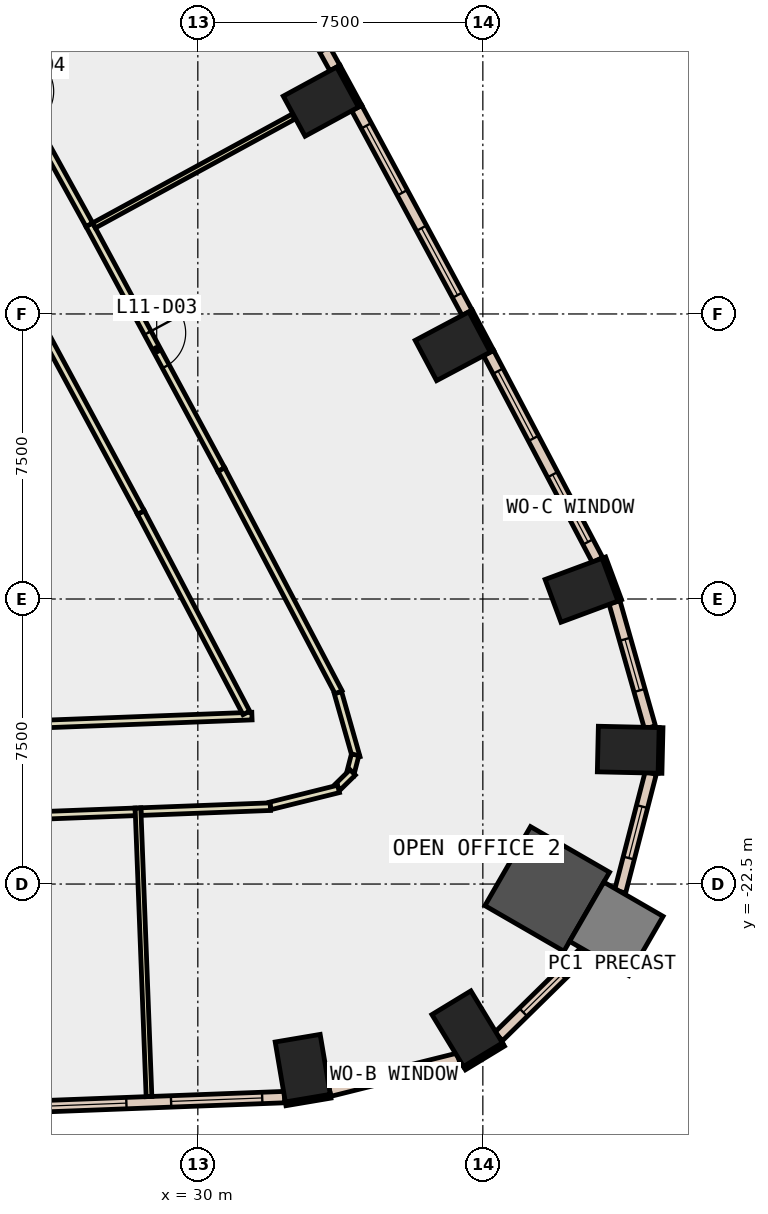
"""IFC4 building model, lengths in metres.
Left out: names, types, materials, properties, quantities, classifications, styles, units other than length and angle.
Written with IfcOpenShell. Run it as: python <this file> out.ifc"""

import sys

from ifc_helpers import new_model, si_unit, direction, frame, frame_2d, origin, origin_2d, place, context, subcontext, project, spatial, rectangle, extrude, element, fill, save


model = new_model("IFC4")
c1 = context("Model", 3, precision=1e-05, world=origin(), true_north=direction((0.0, 1.0)))
c2 = subcontext(c1, "Body", "Model", "MODEL_VIEW")
j1 = project(units=[si_unit("LENGTHUNIT", "METRE"), si_unit("PLANEANGLEUNIT", "RADIAN")], contexts=[c1])
p1 = place(None, origin())
s1 = spatial("IfcSite", under=j1, at=p1, CompositionType="ELEMENT")
p2 = place(p1, origin())
s2 = spatial("IfcBuilding", under=s1, at=p2, CompositionType="ELEMENT")
p3 = place(p2, frame((0.0, 0.0, 56.0)))
s3 = spatial("IfcBuildingStorey", under=s2, at=p3, CompositionType="ELEMENT", Elevation=56.0)
for number, where, z_axis, x_axis in (
    (1, (32.761, -27.345, -0.4), (0.0, 0.0, 1.0), (0.986, 0.167, 0.0)),
    (2, (37.088, -26.307, -0.4), (0.0, 0.0, 1.0), (0.855, 0.519, 0.0)),
):
    element("IfcColumn", number, at=place(p3, frame(where, z_axis=z_axis, x_axis=x_axis)), inside=s3, PredefinedType="COLUMN", context=c2, shape_type="SweptSolid", body=[
        extrude(rectangle(XDim=1.2, YDim=1.6, at=origin_2d()), origin(), (0.0, 0.0, 1.0), 4.2),
    ])
p4 = place(p3, frame((39.194, -22.629, -0.4), z_axis=(0.0, 0.0, 1.0), x_axis=(-0.866025403784, 0.5, 0.0)))
e3 = element("IfcColumn", 3, at=p4, inside=s3, PredefinedType="COLUMN", context=c2, shape_type="SweptSolid", body=[
    extrude(rectangle(XDim=2.4, YDim=2.4, at=origin_2d()), origin(), (0.0, 0.0, 1.0), 4.2),
])
for number, where, z_axis, x_axis in (
    (4, (41.326, -18.966, -0.4), (0.0, 0.0, 1.0), (0.023, 1.0, 0.0)),
    (5, (40.097, -14.77, -0.4), (0.0, 0.0, 1.0), (-0.348, 0.937, 0.0)),
    (6, (36.708, -8.349, -0.4), (0.0, 0.0, 1.0), (-0.469, 0.883, 0.0)),
    (7, (33.238, -1.913, -0.4), (0.0, 0.0, 1.0), (-0.478, 0.878, 0.0)),
):
    element("IfcColumn", number, at=place(p3, frame(where, z_axis=z_axis, x_axis=x_axis)), inside=s3, PredefinedType="COLUMN", context=c2, shape_type="SweptSolid", body=[
        extrude(rectangle(XDim=1.2, YDim=1.6, at=origin_2d()), origin(), (0.0, 0.0, 1.0), 4.2),
    ])
p5 = place(p3, frame((41.013, -23.679, -0.4), z_axis=(0.0, 0.0, 1.0), x_axis=(-0.866025403784, 0.5, 0.0)))
e8 = element("IfcColumn", 8, at=p5, inside=s3, PredefinedType="COLUMN", context=c2, shape_type="SweptSolid", body=[
    extrude(rectangle(XDim=1.8, YDim=1.8, at=origin_2d()), origin(), (0.0, 0.0, 1.0), 4.2),
])
p6 = place(p3, frame((41.103, -15.037, 0.0), z_axis=(0.0, 0.0, 1.0), x_axis=(-0.348268249601, 0.937394914814, 0.0)))
e9 = element("IfcWall", 9, at=p6, inside=s3, PredefinedType="STANDARD", context=c2, shape_type="SweptSolid", body=[
    extrude(rectangle(XDim=1.2, YDim=0.1, at=frame_2d((0.6, 0.0))), origin(), (0.0, 0.0, 1.0), 3.8),
])
p7 = place(p3, frame((37.74, -8.48, 0.0), z_axis=(0.0, 0.0, 1.0), x_axis=(-0.469383408131, 0.882994459876, 0.0)))
e10 = element("IfcWall", 10, at=p7, inside=s3, PredefinedType="STANDARD", context=c2, shape_type="SweptSolid", body=[
    extrude(rectangle(XDim=1.199, YDim=0.1, at=frame_2d((0.6, 0.0))), origin(), (0.0, 0.0, 1.0), 3.8),
])
p8 = place(p3, frame((34.271, -2.034, 0.0), z_axis=(0.0, 0.0, 1.0), x_axis=(-0.478267644701, 0.878214131082, 0.0)))
e11 = element("IfcWall", 11, at=p8, inside=s3, PredefinedType="STANDARD", context=c2, shape_type="SweptSolid", body=[
    extrude(rectangle(XDim=1.2, YDim=0.1, at=frame_2d((0.6, 0.0))), origin(), (0.0, 0.0, 1.0), 3.8),
])
p9 = place(p3, frame((32.311, -28.283, 0.0), z_axis=(0.0, 0.0, 1.0), x_axis=(0.986011774526, 0.166675674579, 0.0)))
e12 = element("IfcWall", 12, at=p9, inside=s3, PredefinedType="STANDARD", context=c2, shape_type="SweptSolid", body=[
    extrude(rectangle(XDim=1.2, YDim=0.1, at=frame_2d((0.6, 0.0))), origin(), (0.0, 0.0, 1.0), 3.8),
])
for number, where, z_axis, x_axis in (
    (13, (37.016, -27.345, 0.0), (0.0, 0.0, 1.0), (0.855, 0.519, 0.0)),
    (14, (42.162, -19.585, 0.0), (0.0, 0.0, 1.0), (0.023, 1.0, 0.0)),
):
    element("IfcWall", number, at=place(p3, frame(where, z_axis=z_axis, x_axis=x_axis)), inside=s3, PredefinedType="STANDARD", context=c2, shape_type="SweptSolid", body=[
        extrude(rectangle(XDim=1.2, YDim=0.1, at=frame_2d((0.6, 0.0))), origin(), (0.0, 0.0, 1.0), 3.8),
    ])
p10 = place(p3, frame((25.134, -28.378, 0.0), z_axis=(0.0, 0.0, 1.0), x_axis=(0.999276920032, 0.038021534562, 0.0)))
e15 = element("IfcWall", 15, at=p10, inside=s3, PredefinedType="STANDARD", context=c2, shape_type="SweptSolid", body=[
    extrude(rectangle(XDim=7.153, YDim=0.3, at=frame_2d((3.577, 0.0))), origin(), (0.0, 0.0, 1.0), 3.8),
])
p11 = place(p10, frame((0.588, 0.0, 0.9)))
e16 = element("IfcOpeningElement", 16, at=p11, cuts=e15, PredefinedType="OPENING", context=c2, shape_type="SweptSolid", body=[
    extrude(rectangle(XDim=2.4, YDim=2.6, at=frame_2d((1.2, 1.3))), frame((0.0, 0.16, 0.0), z_axis=(0.0, -1.0, 0.0), x_axis=(1.0, 0.0, 0.0)), (0.0, 0.0, 1.0), 0.32),
])
p12 = place(p10, frame((4.165, 0.0, 0.9)))
e17 = element("IfcOpeningElement", 17, at=p12, cuts=e15, PredefinedType="OPENING", context=c2, shape_type="SweptSolid", body=[
    extrude(rectangle(XDim=2.4, YDim=2.6, at=frame_2d((1.2, 1.3))), frame((0.0, 0.16, 0.0), z_axis=(0.0, -1.0, 0.0), x_axis=(1.0, 0.0, 0.0)), (0.0, 0.0, 1.0), 0.32),
])
p13 = place(p3, frame((33.469, -27.939, 0.0), z_axis=(0.0, 0.0, 1.0), x_axis=(0.970331016871, 0.241780308749, 0.0)))
e18 = element("IfcWall", 18, at=p13, inside=s3, PredefinedType="STANDARD", context=c2, shape_type="SweptSolid", body=[
    extrude(rectangle(XDim=3.499, YDim=0.3, at=frame_2d((1.75, 0.0))), origin(), (0.0, 0.0, 1.0), 3.8),
])
p14 = place(p13, frame((1.049, 0.0, 0.9)))
e19 = element("IfcOpeningElement", 19, at=p14, cuts=e18, PredefinedType="OPENING", context=c2, shape_type="SweptSolid", body=[
    extrude(rectangle(XDim=1.4, YDim=2.6, at=frame_2d((0.7, 1.3))), frame((0.0, 0.16, 0.0), z_axis=(0.0, -1.0, 0.0), x_axis=(1.0, 0.0, 0.0)), (0.0, 0.0, 1.0), 0.32),
])
p15 = place(p3, frame((37.914, -26.513, 0.0), z_axis=(0.0, 0.0, 1.0), x_axis=(0.71340487189, 0.700752087948, 0.0)))
e20 = element("IfcWall", 20, at=p15, inside=s3, PredefinedType="STANDARD", context=c2, shape_type="SweptSolid", body=[
    extrude(rectangle(XDim=3.222, YDim=0.3, at=frame_2d((1.611, 0.0))), origin(), (0.0, 0.0, 1.0), 3.8),
])
p16 = place(p15, frame((0.911, 0.0, 0.9)))
e21 = element("IfcOpeningElement", 21, at=p16, cuts=e20, PredefinedType="OPENING", context=c2, shape_type="SweptSolid", body=[
    extrude(rectangle(XDim=1.4, YDim=2.6, at=frame_2d((0.7, 1.3))), frame((0.0, 0.16, 0.0), z_axis=(0.0, -1.0, 0.0), x_axis=(1.0, 0.0, 0.0)), (0.0, 0.0, 1.0), 0.32),
])
p17 = place(p3, frame((41.112, -22.698, 0.0), z_axis=(0.0, 0.0, 1.0), x_axis=(0.250086521833, 0.968223492587, 0.0)))
e22 = element("IfcWall", 22, at=p17, inside=s3, PredefinedType="STANDARD", context=c2, shape_type="SweptSolid", body=[
    extrude(rectangle(XDim=3.222, YDim=0.3, at=frame_2d((1.611, 0.0))), origin(), (0.0, 0.0, 1.0), 3.8),
])
p18 = place(p17, frame((0.911, 0.0, 0.9)))
e23 = element("IfcOpeningElement", 23, at=p18, cuts=e22, PredefinedType="OPENING", context=c2, shape_type="SweptSolid", body=[
    extrude(rectangle(XDim=1.4, YDim=2.6, at=frame_2d((0.7, 1.3))), frame((0.0, 0.16, 0.0), z_axis=(0.0, -1.0, 0.0), x_axis=(1.0, 0.0, 0.0)), (0.0, 0.0, 1.0), 0.32),
])
p19 = place(p3, frame((41.898, -18.379, 0.0), z_axis=(0.0, 0.0, 1.0), x_axis=(-0.272901963142, 0.962041848629, 0.0)))
e24 = element("IfcWall", 24, at=p19, inside=s3, PredefinedType="STANDARD", context=c2, shape_type="SweptSolid", body=[
    extrude(rectangle(XDim=3.422, YDim=0.3, at=frame_2d((1.711, 0.0))), origin(), (0.0, 0.0, 1.0), 3.8),
])
p20 = place(p19, frame((1.011, 0.0, 0.9)))
e25 = element("IfcOpeningElement", 25, at=p20, cuts=e24, PredefinedType="OPENING", context=c2, shape_type="SweptSolid", body=[
    extrude(rectangle(XDim=1.4, YDim=2.6, at=frame_2d((0.7, 1.3))), frame((0.0, 0.16, 0.0), z_axis=(0.0, -1.0, 0.0), x_axis=(1.0, 0.0, 0.0)), (0.0, 0.0, 1.0), 0.32),
])
p21 = place(p3, frame((40.518, -13.975, 0.0), z_axis=(0.0, 0.0, 1.0), x_axis=(-0.465847756605, 0.884864886673, 0.0)))
e26 = element("IfcWall", 26, at=p21, inside=s3, PredefinedType="STANDARD", context=c2, shape_type="SweptSolid", body=[
    extrude(rectangle(XDim=6.157, YDim=0.3, at=frame_2d((3.079, 0.0))), origin(), (0.0, 0.0, 1.0), 3.8),
])
p22 = place(p21, frame((0.539, 0.0, 0.9)))
e27 = element("IfcOpeningElement", 27, at=p22, cuts=e26, PredefinedType="OPENING", context=c2, shape_type="SweptSolid", body=[
    extrude(rectangle(XDim=2.0, YDim=2.6, at=frame_2d((1.0, 1.3))), frame((0.0, 0.16, 0.0), z_axis=(0.0, -1.0, 0.0), x_axis=(1.0, 0.0, 0.0)), (0.0, 0.0, 1.0), 0.32),
])
p23 = place(p21, frame((3.618, 0.0, 0.9)))
e28 = element("IfcOpeningElement", 28, at=p23, cuts=e26, PredefinedType="OPENING", context=c2, shape_type="SweptSolid", body=[
    extrude(rectangle(XDim=2.0, YDim=2.6, at=frame_2d((1.0, 1.3))), frame((0.0, 0.16, 0.0), z_axis=(0.0, -1.0, 0.0), x_axis=(1.0, 0.0, 0.0)), (0.0, 0.0, 1.0), 0.32),
])
p24 = place(p3, frame((37.086, -7.47, 0.0), z_axis=(0.0, 0.0, 1.0), x_axis=(-0.474584950749, 0.880209704856, 0.0)))
e29 = element("IfcWall", 29, at=p24, inside=s3, PredefinedType="STANDARD", context=c2, shape_type="SweptSolid", body=[
    extrude(rectangle(XDim=6.121, YDim=0.3, at=frame_2d((3.061, 0.0))), origin(), (0.0, 0.0, 1.0), 3.8),
])
p25 = place(p24, frame((0.53, 0.0, 0.9)))
e30 = element("IfcOpeningElement", 30, at=p25, cuts=e29, PredefinedType="OPENING", context=c2, shape_type="SweptSolid", body=[
    extrude(rectangle(XDim=2.0, YDim=2.6, at=frame_2d((1.0, 1.3))), frame((0.0, 0.16, 0.0), z_axis=(0.0, -1.0, 0.0), x_axis=(1.0, 0.0, 0.0)), (0.0, 0.0, 1.0), 0.32),
])
p26 = place(p24, frame((3.591, 0.0, 0.9)))
e31 = element("IfcOpeningElement", 31, at=p26, cuts=e29, PredefinedType="OPENING", context=c2, shape_type="SweptSolid", body=[
    extrude(rectangle(XDim=2.0, YDim=2.6, at=frame_2d((1.0, 1.3))), frame((0.0, 0.16, 0.0), z_axis=(0.0, -1.0, 0.0), x_axis=(1.0, 0.0, 0.0)), (0.0, 0.0, 1.0), 0.32),
])
p27 = place(p3, frame((33.607, -1.03, 0.0), z_axis=(0.0, 0.0, 1.0), x_axis=(-0.483195456594, 0.875512507465, 0.0)))
e32 = element("IfcWall", 32, at=p27, inside=s3, PredefinedType="STANDARD", context=c2, shape_type="SweptSolid", body=[
    extrude(rectangle(XDim=6.12, YDim=0.3, at=frame_2d((3.06, 0.0))), origin(), (0.0, 0.0, 1.0), 3.8),
])
p28 = place(p27, frame((0.53, 0.0, 0.9)))
e33 = element("IfcOpeningElement", 33, at=p28, cuts=e32, PredefinedType="OPENING", context=c2, shape_type="SweptSolid", body=[
    extrude(rectangle(XDim=2.0, YDim=2.6, at=frame_2d((1.0, 1.3))), frame((0.0, 0.16, 0.0), z_axis=(0.0, -1.0, 0.0), x_axis=(1.0, 0.0, 0.0)), (0.0, 0.0, 1.0), 0.32),
])
p29 = place(p27, frame((3.59, 0.0, 0.9)))
e34 = element("IfcOpeningElement", 34, at=p29, cuts=e32, PredefinedType="OPENING", context=c2, shape_type="SweptSolid", body=[
    extrude(rectangle(XDim=2.0, YDim=2.6, at=frame_2d((1.0, 1.3))), frame((0.0, 0.16, 0.0), z_axis=(0.0, -1.0, 0.0), x_axis=(1.0, 0.0, 0.0)), (0.0, 0.0, 1.0), 0.32),
])
p30 = place(p3, frame((24.208, -18.356, 0.0), z_axis=(0.0, 0.0, 1.0), x_axis=(0.999275140761, 0.03806826838, 0.0)))
e35 = element("IfcWall", 35, at=p30, inside=s3, PredefinedType="PARTITIONING", context=c2, shape_type="SweptSolid", body=[
    extrude(rectangle(XDim=7.221, YDim=0.2, at=frame_2d((3.611, 0.0))), origin(), (0.0, 0.0, 1.0), 3.8),
])
p31 = place(p3, frame((31.277, -17.997, 0.0), z_axis=(0.0, 0.0, 1.0), x_axis=(-0.465862938277, 0.884856893933, 0.0)))
e36 = element("IfcWall", 36, at=p31, inside=s3, PredefinedType="PARTITIONING", context=c2, shape_type="SweptSolid", body=[
    extrude(rectangle(XDim=5.959, YDim=0.2, at=frame_2d((2.979, 0.0))), origin(), (0.0, 0.0, 1.0), 3.8),
])
p32 = place(p3, frame((28.501, -12.724, 0.0), z_axis=(0.0, 0.0, 1.0), x_axis=(-0.474575559827, 0.880214768119, 0.0)))
e37 = element("IfcWall", 37, at=p32, inside=s3, PredefinedType="PARTITIONING", context=c2, shape_type="SweptSolid", body=[
    extrude(rectangle(XDim=7.221, YDim=0.2, at=frame_2d((3.611, 0.0))), origin(), (0.0, 0.0, 1.0), 3.8),
])
p33 = place(p3, frame((28.354, -20.6, 0.0), z_axis=(0.0, 0.0, 1.0), x_axis=(-0.999276945714, -0.038020859604, 0.0)))
e38 = element("IfcWall", 38, at=p33, inside=s3, PredefinedType="PARTITIONING", context=c2, shape_type="SweptSolid", body=[
    extrude(rectangle(XDim=4.071, YDim=0.2, at=frame_2d((2.036, 0.0))), origin(), (0.0, 0.0, 1.0), 3.8),
])
p34 = place(p3, frame((27.145, -5.152, 0.0), z_axis=(0.0, 0.0, 1.0), x_axis=(0.474591029089, -0.880206427554, 0.0)))
e39 = element("IfcWall", 39, at=p34, inside=s3, PredefinedType="PARTITIONING", context=c2, shape_type="SweptSolid", body=[
    extrude(rectangle(XDim=7.32, YDim=0.2, at=frame_2d((3.66, 0.0))), origin(), (0.0, 0.0, 1.0), 3.8),
])
p35 = place(p34, frame((3.235, 0.0, 0.0)))
e40 = element("IfcOpeningElement", 40, at=p35, cuts=e39, PredefinedType="OPENING", context=c2, shape_type="SweptSolid", body=[
    extrude(rectangle(XDim=1.0, YDim=2.1, at=frame_2d((0.5, 1.05))), frame((0.0, 0.11, 0.0), z_axis=(0.0, -1.0, 0.0), x_axis=(1.0, 0.0, 0.0)), (0.0, 0.0, 1.0), 0.22),
])
p36 = place(p3, frame((30.619, -11.595, 0.0), z_axis=(0.0, 0.0, 1.0), x_axis=(0.465905874098, -0.884834287582, 0.0)))
e41 = element("IfcWall", 41, at=p36, inside=s3, PredefinedType="PARTITIONING", context=c2, shape_type="SweptSolid", body=[
    extrude(rectangle(XDim=6.626, YDim=0.2, at=frame_2d((3.313, 0.0))), origin(), (0.0, 0.0, 1.0), 3.8),
])
p37 = place(p3, frame((33.687, -17.466, 0.0), z_axis=(0.0, 0.0, 1.0), x_axis=(0.272780480932, -0.962076301144, 0.0)))
e42 = element("IfcWall", 42, at=p37, inside=s3, PredefinedType="PARTITIONING", context=c2, shape_type="SweptSolid", body=[
    extrude(rectangle(XDim=1.778, YDim=0.2, at=frame_2d((0.889, 0.0))), origin(), (0.0, 0.0, 1.0), 3.8),
])
p38 = place(p3, frame((34.14, -19.099, 0.0), z_axis=(0.0, 0.0, 1.0), x_axis=(-0.249326881699, -0.968419385423, 0.0)))
e43 = element("IfcWall", 43, at=p38, inside=s3, PredefinedType="PARTITIONING", context=c2, shape_type="SweptSolid", body=[
    extrude(rectangle(XDim=0.549, YDim=0.2, at=frame_2d((0.275, 0.0))), origin(), (0.0, 0.0, 1.0), 3.8),
])
p39 = place(p3, frame((34.074, -19.562, 0.0), z_axis=(0.0, 0.0, 1.0), x_axis=(-0.713456013967, -0.700700018649, 0.0)))
e44 = element("IfcWall", 44, at=p39, inside=s3, PredefinedType="PARTITIONING", context=c2, shape_type="SweptSolid", body=[
    extrude(rectangle(XDim=0.555, YDim=0.2, at=frame_2d((0.277, 0.0))), origin(), (0.0, 0.0, 1.0), 3.8),
])
p40 = place(p3, frame((33.703, -19.997, 0.0), z_axis=(0.0, 0.0, 1.0), x_axis=(-0.970421070494, -0.241418611423, 0.0)))
e45 = element("IfcWall", 45, at=p40, inside=s3, PredefinedType="PARTITIONING", context=c2, shape_type="SweptSolid", body=[
    extrude(rectangle(XDim=1.852, YDim=0.2, at=frame_2d((0.926, 0.0))), origin(), (0.0, 0.0, 1.0), 3.8),
])
p41 = place(p3, frame((31.909, -20.464, 0.0), z_axis=(0.0, 0.0, 1.0), x_axis=(-0.999273295147, -0.038116684091, 0.0)))
e46 = element("IfcWall", 46, at=p41, inside=s3, PredefinedType="PARTITIONING", context=c2, shape_type="SweptSolid", body=[
    extrude(rectangle(XDim=3.407, YDim=0.2, at=frame_2d((1.704, 0.0))), origin(), (0.0, 0.0, 1.0), 3.8),
])
p42 = place(p3, frame((23.681, 1.124, 0.0), z_axis=(0.0, 0.0, 1.0), x_axis=(0.483125061868, -0.875551354631, 0.0)))
e47 = element("IfcWall", 47, at=p42, inside=s3, PredefinedType="PARTITIONING", context=c2, shape_type="SweptSolid", body=[
    extrude(rectangle(XDim=7.168, YDim=0.2, at=frame_2d((3.584, 0.0))), origin(), (0.0, 0.0, 1.0), 3.8),
])
p43 = place(p42, frame((3.159, 0.0, 0.0)))
e48 = element("IfcOpeningElement", 48, at=p43, cuts=e47, PredefinedType="OPENING", context=c2, shape_type="SweptSolid", body=[
    extrude(rectangle(XDim=1.0, YDim=2.1, at=frame_2d((0.5, 1.05))), frame((0.0, 0.11, 0.0), z_axis=(0.0, -1.0, 0.0), x_axis=(1.0, 0.0, 0.0)), (0.0, 0.0, 1.0), 0.22),
])
p44 = place(p3, frame((28.425, -20.497, 0.0), z_axis=(0.0, 0.0, 1.0), x_axis=(0.03816049016, -0.999271623229, 0.0)))
e49 = element("IfcWall", 49, at=p44, inside=s3, PredefinedType="PARTITIONING", context=c2, shape_type="SweptSolid", body=[
    extrude(rectangle(XDim=7.601, YDim=0.15, at=frame_2d((3.8, 0.0))), origin(), (0.0, 0.0, 1.0), 3.8),
])
p45 = place(p3, frame((27.268, -5.171, 0.0), z_axis=(0.0, 0.0, 1.0), x_axis=(0.877837854343, 0.478957932895, 0.0)))
e50 = element("IfcWall", 50, at=p45, inside=s3, PredefinedType="PARTITIONING", context=c2, shape_type="SweptSolid", body=[
    extrude(rectangle(XDim=5.982, YDim=0.15, at=frame_2d((2.991, 0.0))), origin(), (0.0, 0.0, 1.0), 3.8),
])
p46 = place(p11, origin())
e51 = element("IfcWindow", 51, at=p46, inside=s3, PartitioningType="SINGLE_PANEL", PredefinedType="WINDOW", context=c2, shape_type="SweptSolid", body=[
    extrude(rectangle(XDim=2.4, YDim=2.6, at=frame_2d((1.2, 1.3))), frame((0.0, 0.03, 0.0), z_axis=(0.0, -1.0, 0.0), x_axis=(1.0, 0.0, 0.0)), (0.0, 0.0, 1.0), 0.06),
])
fill(e16, e51)
p47 = place(p12, origin())
e52 = element("IfcWindow", 52, at=p47, inside=s3, PartitioningType="SINGLE_PANEL", PredefinedType="WINDOW", context=c2, shape_type="SweptSolid", body=[
    extrude(rectangle(XDim=2.4, YDim=2.6, at=frame_2d((1.2, 1.3))), frame((0.0, 0.03, 0.0), z_axis=(0.0, -1.0, 0.0), x_axis=(1.0, 0.0, 0.0)), (0.0, 0.0, 1.0), 0.06),
])
fill(e17, e52)
p48 = place(p14, origin())
e53 = element("IfcWindow", 53, at=p48, inside=s3, PartitioningType="SINGLE_PANEL", PredefinedType="WINDOW", context=c2, shape_type="SweptSolid", body=[
    extrude(rectangle(XDim=1.4, YDim=2.6, at=frame_2d((0.7, 1.3))), frame((0.0, 0.03, 0.0), z_axis=(0.0, -1.0, 0.0), x_axis=(1.0, 0.0, 0.0)), (0.0, 0.0, 1.0), 0.06),
])
fill(e19, e53)
p49 = place(p16, origin())
e54 = element("IfcWindow", 54, at=p49, inside=s3, PartitioningType="SINGLE_PANEL", PredefinedType="WINDOW", context=c2, shape_type="SweptSolid", body=[
    extrude(rectangle(XDim=1.4, YDim=2.6, at=frame_2d((0.7, 1.3))), frame((0.0, 0.03, 0.0), z_axis=(0.0, -1.0, 0.0), x_axis=(1.0, 0.0, 0.0)), (0.0, 0.0, 1.0), 0.06),
])
fill(e21, e54)
p50 = place(p18, origin())
e55 = element("IfcWindow", 55, at=p50, inside=s3, PartitioningType="SINGLE_PANEL", PredefinedType="WINDOW", context=c2, shape_type="SweptSolid", body=[
    extrude(rectangle(XDim=1.4, YDim=2.6, at=frame_2d((0.7, 1.3))), frame((0.0, 0.03, 0.0), z_axis=(0.0, -1.0, 0.0), x_axis=(1.0, 0.0, 0.0)), (0.0, 0.0, 1.0), 0.06),
])
fill(e23, e55)
p51 = place(p20, origin())
e56 = element("IfcWindow", 56, at=p51, inside=s3, PartitioningType="SINGLE_PANEL", PredefinedType="WINDOW", context=c2, shape_type="SweptSolid", body=[
    extrude(rectangle(XDim=1.4, YDim=2.6, at=frame_2d((0.7, 1.3))), frame((0.0, 0.03, 0.0), z_axis=(0.0, -1.0, 0.0), x_axis=(1.0, 0.0, 0.0)), (0.0, 0.0, 1.0), 0.06),
])
fill(e25, e56)
p52 = place(p22, origin())
e57 = element("IfcWindow", 57, at=p52, inside=s3, PartitioningType="SINGLE_PANEL", PredefinedType="WINDOW", context=c2, shape_type="SweptSolid", body=[
    extrude(rectangle(XDim=2.0, YDim=2.6, at=frame_2d((1.0, 1.3))), frame((0.0, 0.03, 0.0), z_axis=(0.0, -1.0, 0.0), x_axis=(1.0, 0.0, 0.0)), (0.0, 0.0, 1.0), 0.06),
])
fill(e27, e57)
p53 = place(p23, origin())
e58 = element("IfcWindow", 58, at=p53, inside=s3, PartitioningType="SINGLE_PANEL", PredefinedType="WINDOW", context=c2, shape_type="SweptSolid", body=[
    extrude(rectangle(XDim=2.0, YDim=2.6, at=frame_2d((1.0, 1.3))), frame((0.0, 0.03, 0.0), z_axis=(0.0, -1.0, 0.0), x_axis=(1.0, 0.0, 0.0)), (0.0, 0.0, 1.0), 0.06),
])
fill(e28, e58)
p54 = place(p25, origin())
e59 = element("IfcWindow", 59, at=p54, inside=s3, PartitioningType="SINGLE_PANEL", PredefinedType="WINDOW", context=c2, shape_type="SweptSolid", body=[
    extrude(rectangle(XDim=2.0, YDim=2.6, at=frame_2d((1.0, 1.3))), frame((0.0, 0.03, 0.0), z_axis=(0.0, -1.0, 0.0), x_axis=(1.0, 0.0, 0.0)), (0.0, 0.0, 1.0), 0.06),
])
fill(e30, e59)
p55 = place(p26, origin())
e60 = element("IfcWindow", 60, at=p55, inside=s3, PartitioningType="SINGLE_PANEL", PredefinedType="WINDOW", context=c2, shape_type="SweptSolid", body=[
    extrude(rectangle(XDim=2.0, YDim=2.6, at=frame_2d((1.0, 1.3))), frame((0.0, 0.03, 0.0), z_axis=(0.0, -1.0, 0.0), x_axis=(1.0, 0.0, 0.0)), (0.0, 0.0, 1.0), 0.06),
])
fill(e31, e60)
p56 = place(p35, origin())
e61 = element("IfcDoor", 61, at=p56, inside=s3, OperationType="SINGLE_SWING_RIGHT", PredefinedType="DOOR", context=c2, shape_type="SweptSolid", body=[
    extrude(rectangle(XDim=1.0, YDim=2.1, at=frame_2d((0.5, 1.05))), frame((0.0, 0.025, 0.0), z_axis=(0.0, -1.0, 0.0), x_axis=(1.0, 0.0, 0.0)), (0.0, 0.0, 1.0), 0.05),
])
fill(e40, e61)
save(model, sys.argv[1])
